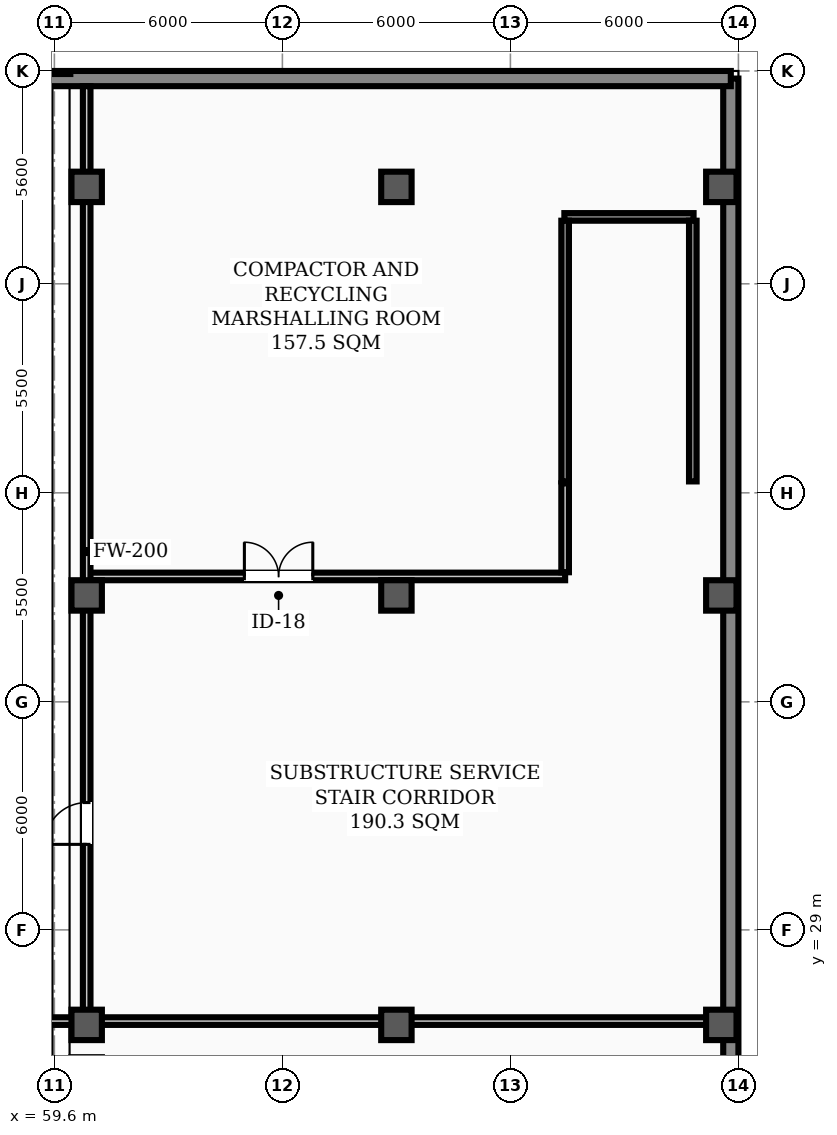
"""IFC4 building model, lengths in metres.
Left out: names, types, materials, properties, quantities, classifications, styles, units other than length and angle.
Written with IfcOpenShell. Run it as: python <this file> out.ifc"""

import sys

from ifc_helpers import new_model, si_unit, direction, frame, frame_2d, origin, origin_2d, place, context, subcontext, project, spatial, rectangle, extrude, element, fill, save


model = new_model("IFC4")
c1 = context("Model", 3, precision=1e-05, world=origin(), true_north=direction((0.0, 1.0)))
c2 = subcontext(c1, "Body", "Model", "MODEL_VIEW")
j1 = project(units=[si_unit("LENGTHUNIT", "METRE"), si_unit("PLANEANGLEUNIT", "RADIAN")], contexts=[c1])
p1 = place(None, origin())
s1 = spatial("IfcSite", under=j1, at=p1, CompositionType="ELEMENT")
p2 = place(p1, origin())
s2 = spatial("IfcBuilding", under=s1, at=p2, CompositionType="ELEMENT")
p3 = place(p2, frame((0.0, 0.0, -5.0)))
s3 = spatial("IfcBuildingStorey", under=s2, at=p3, CompositionType="ELEMENT", Elevation=-5.0)
for number, where, z_axis, x_axis in (
    (1, (60.45, 26.5, 0.0), (0.0, 0.0, 1.0), (1.0, 0.0, 0.0)),
    (2, (60.45, 37.8, 0.0), (0.0, 0.0, 1.0), (1.0, 0.0, 0.0)),
    (3, (60.45, 48.55, 0.0), (0.0, 0.0, 1.0), (1.0, 0.0, 0.0)),
    (4, (68.6, 26.5, 0.0), (0.0, 0.0, 1.0), (1.0, 0.0, 0.0)),
    (5, (68.6, 37.8, 0.0), (0.0, 0.0, 1.0), (1.0, 0.0, 0.0)),
    (6, (68.6, 48.55, 0.0), (0.0, 0.0, 1.0), (1.0, 0.0, 0.0)),
    (7, (77.15, 26.5, 0.0), (0.0, 0.0, 1.0), (1.0, 0.0, 0.0)),
    (8, (77.15, 37.8, 0.0), (0.0, 0.0, 1.0), (1.0, 0.0, 0.0)),
    (9, (77.15, 48.55, 0.0), (0.0, 0.0, 1.0), (1.0, 0.0, 0.0)),
):
    element("IfcColumn", number, at=place(p3, frame(where, z_axis=z_axis, x_axis=x_axis)), inside=s3, PredefinedType="COLUMN", context=c2, shape_type="SweptSolid", body=[
        extrude(rectangle(XDim=0.8, YDim=0.8, at=origin_2d()), origin(), (0.0, 0.0, 1.0), 5.0),
    ])
p4 = place(p3, frame((77.4, 0.2, 0.0), z_axis=(0.0, 0.0, 1.0), x_axis=(0.0, 1.0, 0.0)))
e10 = element("IfcWall", 10, at=p4, inside=s3, PredefinedType="SOLIDWALL", context=c2, shape_type="SweptSolid", body=[
    extrude(rectangle(XDim=51.2, YDim=0.4, at=frame_2d((25.6, 0.0))), origin(), (0.0, 0.0, 1.0), 4.75),
])
p5 = place(p3, frame((77.4, 51.4, 0.0), z_axis=(0.0, 0.0, 1.0), x_axis=(-1.0, 0.0, 0.0)))
e11 = element("IfcWall", 11, at=p5, inside=s3, PredefinedType="SOLIDWALL", context=c2, shape_type="SweptSolid", body=[
    extrude(rectangle(XDim=77.2, YDim=0.4, at=frame_2d((38.6, 0.0))), origin(), (0.0, 0.0, 1.0), 4.75),
])
p6 = place(p3, frame((73.02, 47.76, 0.0), z_axis=(0.0, 0.0, 1.0), x_axis=(1.0, 0.0, 0.0)))
e12 = element("IfcWall", 12, at=p6, inside=s3, PredefinedType="STANDARD", context=c2, shape_type="SweptSolid", body=[
    extrude(rectangle(XDim=3.4, YDim=0.2, at=frame_2d((1.7, 0.0))), origin(), (0.0, 0.0, 1.0), 4.78),
])
for number, where, z_axis, x_axis in (
    (13, (73.04, 40.8, 0.0), (0.0, 0.0, 1.0), (0.0, 1.0, 0.0)),
    (14, (76.4, 40.8, 0.0), (0.0, 0.0, 1.0), (0.0, 1.0, 0.0)),
):
    element("IfcWall", number, at=place(p3, frame(where, z_axis=z_axis, x_axis=x_axis)), inside=s3, PredefinedType="STANDARD", context=c2, shape_type="SweptSolid", body=[
        extrude(rectangle(XDim=6.86, YDim=0.2, at=frame_2d((3.43, 0.0))), origin(), (0.0, 0.0, 1.0), 4.78),
    ])
p7 = place(p3, frame((0.4, 26.6, 0.0), z_axis=(0.0, 0.0, 1.0), x_axis=(1.0, 0.0, 0.0)))
e15 = element("IfcWall", 15, at=p7, inside=s3, PredefinedType="STANDARD", context=c2, shape_type="SweptSolid", body=[
    extrude(rectangle(XDim=76.8, YDim=0.2, at=frame_2d((38.4, 0.0))), origin(), (0.0, 0.0, 1.0), 4.03),
])
p8 = place(p7, frame((26.55, 0.0, 0.0)))
e16 = element("IfcOpeningElement", 16, at=p8, cuts=e15, PredefinedType="OPENING", context=c2, shape_type="SweptSolid", body=[
    extrude(rectangle(XDim=1.1, YDim=2.08, at=frame_2d((0.55, 1.04))), frame((0.0, 0.11, 0.0), z_axis=(0.0, -1.0, 0.0), x_axis=(1.0, 0.0, 0.0)), (0.0, 0.0, 1.0), 0.22),
])
p9 = place(p7, frame((39.875, 0.0, 0.0)))
e17 = element("IfcOpeningElement", 17, at=p9, cuts=e15, PredefinedType="OPENING", context=c2, shape_type="SweptSolid", body=[
    extrude(rectangle(XDim=0.95, YDim=2.08, at=frame_2d((0.475, 1.04))), frame((0.0, 0.11, 0.0), z_axis=(0.0, -1.0, 0.0), x_axis=(1.0, 0.0, 0.0)), (0.0, 0.0, 1.0), 0.22),
])
p10 = place(p7, frame((52.7, 0.0, 0.0)))
e18 = element("IfcOpeningElement", 18, at=p10, cuts=e15, PredefinedType="OPENING", context=c2, shape_type="SweptSolid", body=[
    extrude(rectangle(XDim=1.8, YDim=2.08, at=frame_2d((0.9, 1.04))), frame((0.0, 0.11, 0.0), z_axis=(0.0, -1.0, 0.0), x_axis=(1.0, 0.0, 0.0)), (0.0, 0.0, 1.0), 0.22),
])
p11 = place(p3, frame((60.45, 38.3, 0.0), z_axis=(0.0, 0.0, 1.0), x_axis=(1.0, 0.0, 0.0)))
e19 = element("IfcWall", 19, at=p11, inside=s3, PredefinedType="STANDARD", context=c2, shape_type="SweptSolid", body=[
    extrude(rectangle(XDim=12.59, YDim=0.2, at=frame_2d((6.295, 0.0))), origin(), (0.0, 0.0, 1.0), 4.03),
])
p12 = place(p11, frame((4.15, 0.0, 0.0)))
e20 = element("IfcOpeningElement", 20, at=p12, cuts=e19, PredefinedType="OPENING", context=c2, shape_type="SweptSolid", body=[
    extrude(rectangle(XDim=1.8, YDim=2.08, at=frame_2d((0.9, 1.04))), frame((0.0, 0.11, 0.0), z_axis=(0.0, -1.0, 0.0), x_axis=(1.0, 0.0, 0.0)), (0.0, 0.0, 1.0), 0.22),
])
p13 = place(p3, frame((60.45, 26.71, 0.0), z_axis=(0.0, 0.0, 1.0), x_axis=(0.0, 1.0, 0.0)))
e21 = element("IfcWall", 21, at=p13, inside=s3, PredefinedType="STANDARD", context=c2, shape_type="SweptSolid", body=[
    extrude(rectangle(XDim=24.49, YDim=0.2, at=frame_2d((12.245, 0.0))), origin(), (0.0, 0.0, 1.0), 4.03),
])
p14 = place(p13, frame((4.54, 0.0, 0.0)))
e22 = element("IfcOpeningElement", 22, at=p14, cuts=e21, PredefinedType="OPENING", context=c2, shape_type="SweptSolid", body=[
    extrude(rectangle(XDim=1.1, YDim=2.08, at=frame_2d((0.55, 1.04))), frame((0.0, 0.11, 0.0), z_axis=(0.0, -1.0, 0.0), x_axis=(1.0, 0.0, 0.0)), (0.0, 0.0, 1.0), 0.22),
])
p15 = place(p3, frame((73.04, 38.41, 0.0), z_axis=(0.0, 0.0, 1.0), x_axis=(0.0, 1.0, 0.0)))
e23 = element("IfcWall", 23, at=p15, inside=s3, PredefinedType="STANDARD", context=c2, shape_type="SweptSolid", body=[
    extrude(rectangle(XDim=2.34, YDim=0.2, at=frame_2d((1.17, 0.0))), origin(), (0.0, 0.0, 1.0), 4.16),
])
p16 = place(p14, origin())
e24 = element("IfcDoor", 24, at=p16, inside=s3, OperationType="SINGLE_SWING_LEFT", PredefinedType="DOOR", context=c2, shape_type="SweptSolid", body=[
    extrude(rectangle(XDim=1.1, YDim=2.08, at=frame_2d((0.55, 1.04))), frame((0.0, 0.025, 0.0), z_axis=(0.0, -1.0, 0.0), x_axis=(1.0, 0.0, 0.0)), (0.0, 0.0, 1.0), 0.05),
])
fill(e22, e24)
p17 = place(p12, origin())
e25 = element("IfcDoor", 25, at=p17, inside=s3, OperationType="DOUBLE_DOOR_SINGLE_SWING", PredefinedType="DOOR", context=c2, shape_type="SweptSolid", body=[
    extrude(rectangle(XDim=1.8, YDim=2.08, at=frame_2d((0.9, 1.04))), frame((0.0, 0.025, 0.0), z_axis=(0.0, -1.0, 0.0), x_axis=(1.0, 0.0, 0.0)), (0.0, 0.0, 1.0), 0.05),
])
fill(e20, e25)
save(model, sys.argv[1])
